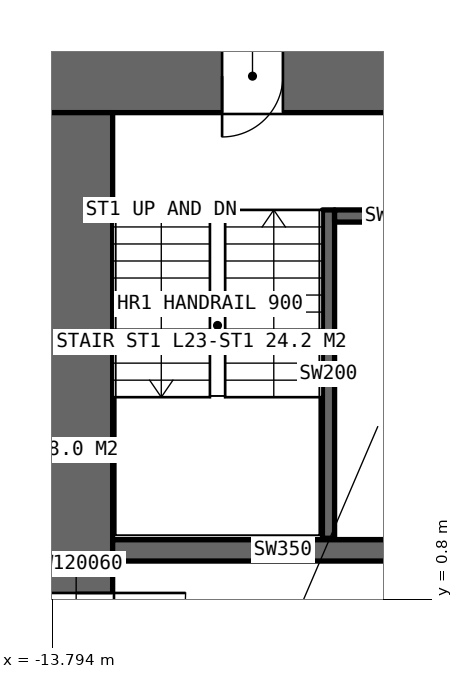
"""IFC4 building model, lengths in metres.
Left out: names, types, materials, properties, quantities, classifications, styles, units other than length and angle.
Written with IfcOpenShell. Run it as: python <this file> out.ifc"""

import sys

from ifc_helpers import new_model, si_unit, direction, frame, frame_2d, origin, place, context, subcontext, project, spatial, rectangle, extrude, element, fill, save


model = new_model("IFC4")
c1 = context("Model", 3, precision=1e-05, world=origin(), true_north=direction((0.0, 1.0)))
c2 = subcontext(c1, "Body", "Model", "MODEL_VIEW")
j1 = project(units=[si_unit("LENGTHUNIT", "METRE"), si_unit("PLANEANGLEUNIT", "RADIAN")], contexts=[c1])
p1 = place(None, origin())
s1 = spatial("IfcSite", under=j1, at=p1, CompositionType="ELEMENT")
p2 = place(p1, origin())
s2 = spatial("IfcBuilding", under=s1, at=p2, CompositionType="ELEMENT")
p3 = place(p2, frame((0.0, 0.0, 113.4)))
s3 = spatial("IfcBuildingStorey", under=s2, at=p3, CompositionType="ELEMENT", Elevation=113.4)
p4 = place(p3, frame((14.0, 9.4, 0.0), z_axis=(0.0, 0.0, 1.0), x_axis=(-1.0, 0.0, 0.0)))
e1 = element("IfcWall", 1, at=p4, inside=s3, PredefinedType="SHEAR", context=c2, shape_type="SweptSolid", body=[
    extrude(rectangle(XDim=28.0, YDim=1.2, at=frame_2d((14.0, 0.0))), origin(), (0.0, 0.0, 1.0), 4.2),
])
p5 = place(p4, frame((24.0, 0.0, 0.0)))
e2 = element("IfcOpeningElement", 2, at=p5, cuts=e1, PredefinedType="OPENING", context=c2, shape_type="SweptSolid", body=[
    extrude(rectangle(XDim=1.0, YDim=2.4, at=frame_2d((0.5, 1.2))), frame((0.0, 0.61, 0.0), z_axis=(0.0, -1.0, 0.0), x_axis=(1.0, 0.0, 0.0)), (0.0, 0.0, 1.0), 1.22),
])
p6 = place(p4, frame((13.1, 0.0, 0.0)))
e3 = element("IfcOpeningElement", 3, at=p6, cuts=e1, PredefinedType="OPENING", context=c2, shape_type="SweptSolid", body=[
    extrude(rectangle(XDim=1.8, YDim=2.4, at=frame_2d((0.9, 1.2))), frame((0.0, 0.61, 0.0), z_axis=(0.0, -1.0, 0.0), x_axis=(1.0, 0.0, 0.0)), (0.0, 0.0, 1.0), 1.22),
])
p7 = place(p3, frame((-13.4, 8.8, 0.0), z_axis=(0.0, 0.0, 1.0), x_axis=(0.0, -1.0, 0.0)))
e4 = element("IfcWall", 4, at=p7, inside=s3, PredefinedType="SHEAR", context=c2, shape_type="SweptSolid", body=[
    extrude(rectangle(XDim=17.6, YDim=1.2, at=frame_2d((8.8, 0.0))), origin(), (0.0, 0.0, 1.0), 4.2),
])
p8 = place(p7, frame((7.9, 0.0, 0.0)))
e5 = element("IfcOpeningElement", 5, at=p8, cuts=e4, PredefinedType="OPENING", context=c2, shape_type="SweptSolid", body=[
    extrude(rectangle(XDim=1.8, YDim=2.4, at=frame_2d((0.9, 1.2))), frame((0.0, 0.61, 0.0), z_axis=(0.0, -1.0, 0.0), x_axis=(1.0, 0.0, 0.0)), (0.0, 0.0, 1.0), 1.22),
])
p9 = place(p7, frame((16.5, 0.0, 0.0)))
e6 = element("IfcOpeningElement", 6, at=p9, cuts=e4, PredefinedType="OPENING", context=c2, shape_type="SweptSolid", body=[
    extrude(rectangle(XDim=1.0, YDim=2.4, at=frame_2d((0.5, 1.2))), frame((0.0, 0.61, 0.0), z_axis=(0.0, -1.0, 0.0), x_axis=(1.0, 0.0, 0.0)), (0.0, 0.0, 1.0), 1.22),
])
p10 = place(p3, frame((-12.8, 1.6, 0.0), z_axis=(0.0, 0.0, 1.0), x_axis=(1.0, 0.0, 0.0)))
e7 = element("IfcWall", 7, at=p10, inside=s3, PredefinedType="SHEAR", context=c2, shape_type="SweptSolid", body=[
    extrude(rectangle(XDim=5.6, YDim=0.35, at=frame_2d((2.8, 0.0))), origin(), (0.0, 0.0, 1.0), 4.2),
])
p11 = place(p3, frame((-9.25, 7.2, 0.0), z_axis=(0.0, 0.0, 1.0), x_axis=(0.0, -1.0, 0.0)))
e8 = element("IfcWall", 8, at=p11, inside=s3, PredefinedType="SOLIDWALL", context=c2, shape_type="SweptSolid", body=[
    extrude(rectangle(XDim=5.4, YDim=0.2, at=frame_2d((2.7, 0.0))), origin(), (0.0, 0.0, 1.0), 4.2),
])
p12 = place(p3, frame((-9.15, 7.1, 0.0), z_axis=(0.0, 0.0, 1.0), x_axis=(1.0, 0.0, 0.0)))
e9 = element("IfcWall", 9, at=p12, inside=s3, PredefinedType="SOLIDWALL", context=c2, shape_type="SweptSolid", body=[
    extrude(rectangle(XDim=1.95, YDim=0.2, at=frame_2d((0.975, 0.0))), origin(), (0.0, 0.0, 1.0), 4.2),
])
p13 = place(p8, origin())
e10 = element("IfcDoor", 10, at=p13, inside=s3, OperationType="DOUBLE_DOOR_SINGLE_SWING", PredefinedType="DOOR", context=c2, shape_type="SweptSolid", body=[
    extrude(rectangle(XDim=1.8, YDim=2.4, at=frame_2d((0.9, 1.2))), frame((0.0, 0.025, 0.0), z_axis=(0.0, -1.0, 0.0), x_axis=(1.0, 0.0, 0.0)), (0.0, 0.0, 1.0), 0.05),
])
fill(e5, e10)
p14 = place(p5, origin())
e11 = element("IfcDoor", 11, at=p14, inside=s3, OperationType="SINGLE_SWING_RIGHT", PredefinedType="DOOR", context=c2, shape_type="SweptSolid", body=[
    extrude(rectangle(XDim=1.0, YDim=2.4, at=frame_2d((0.5, 1.2))), frame((0.0, 0.025, 0.0), z_axis=(0.0, -1.0, 0.0), x_axis=(1.0, 0.0, 0.0)), (0.0, 0.0, 1.0), 0.05),
])
fill(e2, e11)
save(model, sys.argv[1])
